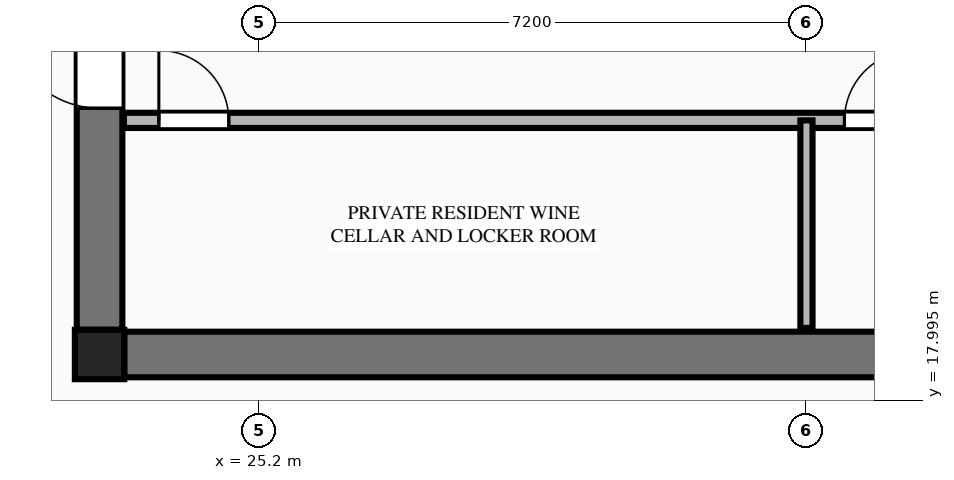
"""IFC4 building model, lengths in metres.
Left out: names, types, materials, properties, quantities, classifications, styles, units other than length and angle.
Written with IfcOpenShell. Run it as: python <this file> out.ifc"""

import sys

from ifc_helpers import new_model, si_unit, direction, frame, frame_2d, origin, origin_2d, place, context, subcontext, project, spatial, rectangle, extrude, element, fill, save


model = new_model("IFC4")
c1 = context("Model", 3, precision=1e-05, world=origin(), true_north=direction((0.0, 1.0)))
c2 = subcontext(c1, "Body", "Model", "MODEL_VIEW")
j1 = project(units=[si_unit("LENGTHUNIT", "METRE"), si_unit("PLANEANGLEUNIT", "RADIAN")], contexts=[c1])
p1 = place(None, origin())
s1 = spatial("IfcSite", under=j1, at=p1, CompositionType="ELEMENT")
p2 = place(p1, origin())
s2 = spatial("IfcBuilding", under=s1, at=p2, CompositionType="ELEMENT")
p3 = place(p2, frame((0.0, 0.0, 175.45)))
s3 = spatial("IfcBuildingStorey", under=s2, at=p3, CompositionType="ELEMENT", Elevation=175.45)
p4 = place(p3, frame((23.1, 18.6, 0.0), z_axis=(0.0, 0.0, 1.0), x_axis=(1.0, 0.0, 0.0)))
e1 = element("IfcColumn", 1, at=p4, inside=s3, PredefinedType="COLUMN", context=c2, shape_type="SweptSolid", body=[
    extrude(rectangle(XDim=0.65, YDim=0.65, at=origin_2d()), origin(), (0.0, 0.0, 1.0), 3.55),
])
p5 = place(p3, frame((23.425, 18.6, 0.0), z_axis=(0.0, 0.0, 1.0), x_axis=(1.0, 0.0, 0.0)))
e2 = element("IfcWall", 2, at=p5, inside=s3, PredefinedType="SHEAR", context=c2, shape_type="SweptSolid", body=[
    extrude(rectangle(XDim=17.95, YDim=0.6, at=frame_2d((8.975, 0.0))), origin(), (0.0, 0.0, 1.0), 3.35),
])
p6 = place(p3, frame((23.1, 18.925, 0.0), z_axis=(0.0, 0.0, 1.0), x_axis=(0.0, 1.0, 0.0)))
e3 = element("IfcWall", 3, at=p6, inside=s3, PredefinedType="SHEAR", context=c2, shape_type="SweptSolid", body=[
    extrude(rectangle(XDim=13.95, YDim=0.6, at=frame_2d((6.975, 0.0))), origin(), (0.0, 0.0, 1.0), 3.35),
])
p7 = place(p6, frame((2.915, 0.0, 0.0)))
e4 = element("IfcOpeningElement", 4, at=p7, cuts=e3, PredefinedType="OPENING", context=c2, shape_type="SweptSolid", body=[
    extrude(rectangle(XDim=1.22, YDim=2.25, at=frame_2d((0.61, 1.125))), frame((0.0, 0.31, 0.0), z_axis=(0.0, -1.0, 0.0), x_axis=(1.0, 0.0, 0.0)), (0.0, 0.0, 1.0), 0.62),
])
p8 = place(p3, frame((23.42, 21.68, 0.0), z_axis=(0.0, 0.0, 1.0), x_axis=(1.0, 0.0, 0.0)))
e5 = element("IfcWall", 5, at=p8, inside=s3, PredefinedType="PLUMBINGWALL", context=c2, shape_type="SweptSolid", body=[
    extrude(rectangle(XDim=17.96, YDim=0.2, at=frame_2d((8.98, 0.0))), origin(), (0.0, 0.0, 1.0), 3.35),
])
p9 = place(p8, frame((0.46, 0.0, 0.0)))
e6 = element("IfcOpeningElement", 6, at=p9, cuts=e5, PredefinedType="OPENING", context=c2, shape_type="SweptSolid", body=[
    extrude(rectangle(XDim=0.92, YDim=2.15, at=frame_2d((0.46, 1.075))), frame((0.0, 0.11, 0.0), z_axis=(0.0, -1.0, 0.0), x_axis=(1.0, 0.0, 0.0)), (0.0, 0.0, 1.0), 0.22),
])
p10 = place(p8, frame((9.48, 0.0, 0.0)))
e7 = element("IfcOpeningElement", 7, at=p10, cuts=e5, PredefinedType="OPENING", context=c2, shape_type="SweptSolid", body=[
    extrude(rectangle(XDim=0.92, YDim=2.15, at=frame_2d((0.46, 1.075))), frame((0.0, 0.11, 0.0), z_axis=(0.0, -1.0, 0.0), x_axis=(1.0, 0.0, 0.0)), (0.0, 0.0, 1.0), 0.22),
])
p11 = place(p3, frame((32.4, 18.95, 0.0), z_axis=(0.0, 0.0, 1.0), x_axis=(0.0, 1.0, 0.0)))
e8 = element("IfcWall", 8, at=p11, inside=s3, PredefinedType="PARTITIONING", context=c2, shape_type="SweptSolid", body=[
    extrude(rectangle(XDim=2.73, YDim=0.16, at=frame_2d((1.365, 0.0))), origin(), (0.0, 0.0, 1.0), 3.35),
])
p12 = place(p7, origin())
e9 = element("IfcDoor", 9, at=p12, inside=s3, OperationType="SINGLE_SWING_RIGHT", PredefinedType="DOOR", context=c2, shape_type="SweptSolid", body=[
    extrude(rectangle(XDim=1.22, YDim=2.25, at=frame_2d((0.61, 1.125))), frame((0.0, 0.025, 0.0), z_axis=(0.0, -1.0, 0.0), x_axis=(1.0, 0.0, 0.0)), (0.0, 0.0, 1.0), 0.05),
])
fill(e4, e9)
p13 = place(p9, origin())
e10 = element("IfcDoor", 10, at=p13, inside=s3, OperationType="SINGLE_SWING_LEFT", PredefinedType="DOOR", context=c2, shape_type="SweptSolid", body=[
    extrude(rectangle(XDim=0.92, YDim=2.15, at=frame_2d((0.46, 1.075))), frame((0.0, 0.025, 0.0), z_axis=(0.0, -1.0, 0.0), x_axis=(1.0, 0.0, 0.0)), (0.0, 0.0, 1.0), 0.05),
])
fill(e6, e10)
p14 = place(p10, origin())
e11 = element("IfcDoor", 11, at=p14, inside=s3, OperationType="SINGLE_SWING_RIGHT", PredefinedType="DOOR", context=c2, shape_type="SweptSolid", body=[
    extrude(rectangle(XDim=0.92, YDim=2.15, at=frame_2d((0.46, 1.075))), frame((0.0, 0.025, 0.0), z_axis=(0.0, -1.0, 0.0), x_axis=(1.0, 0.0, 0.0)), (0.0, 0.0, 1.0), 0.05),
])
fill(e7, e11)
save(model, sys.argv[1])
